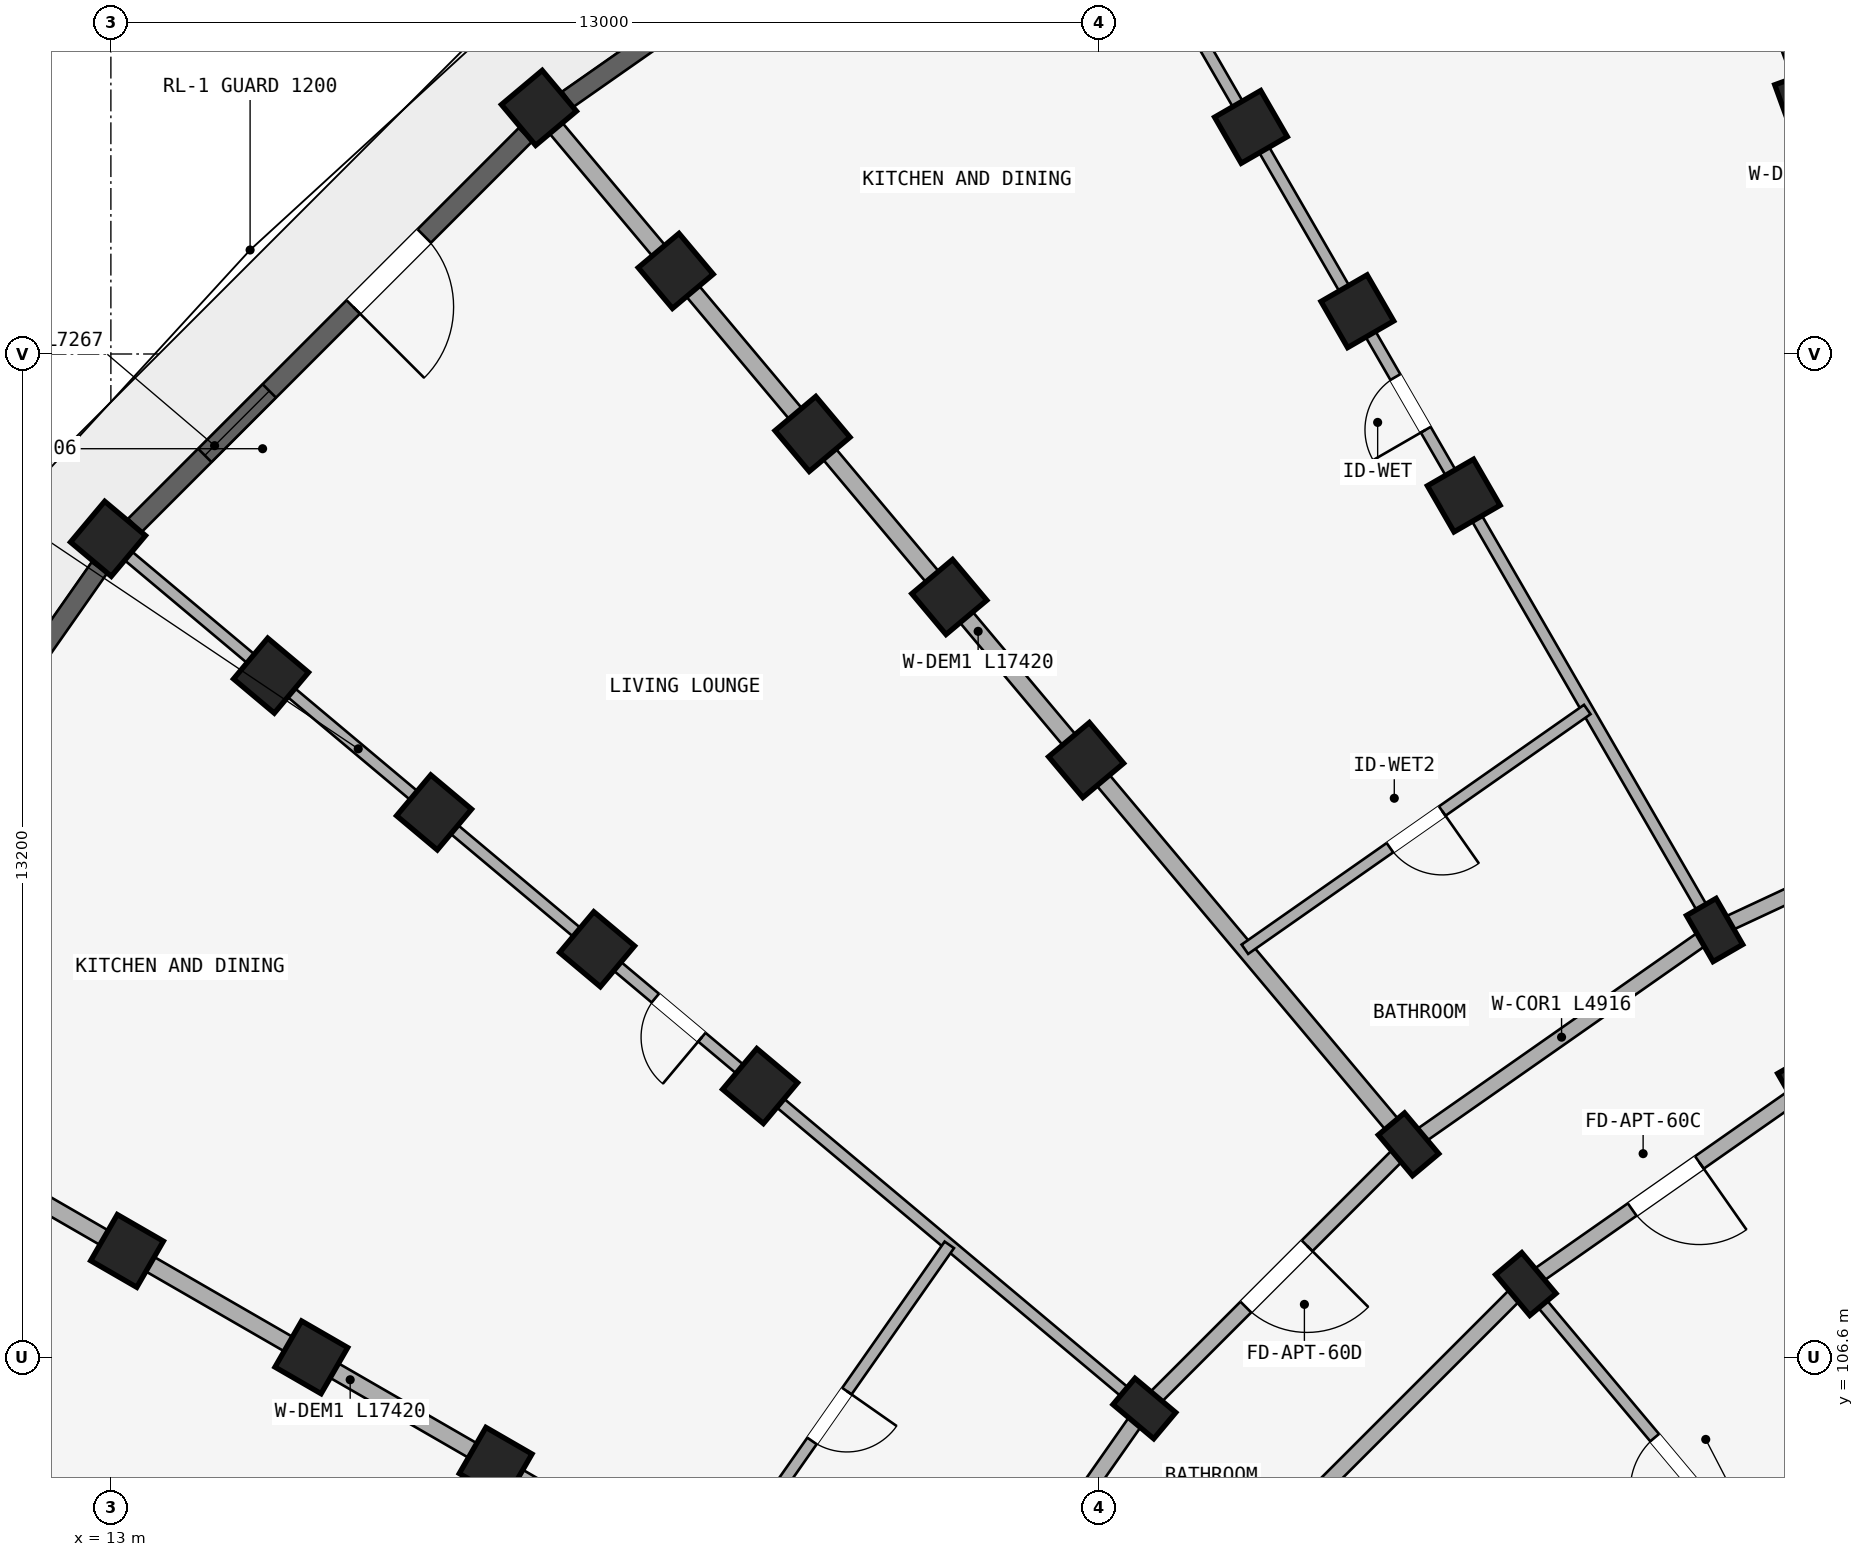
"""IFC4 building model, lengths in metres.
Left out: names, types, materials, properties, quantities, classifications, styles, units other than length and angle.
Written with IfcOpenShell. Run it as: python <this file> out.ifc"""

import sys

from ifc_helpers import new_model, si_unit, direction, frame, frame_2d, origin, origin_2d, place, context, subcontext, project, spatial, rectangle, extrude, element, fill, save


model = new_model("IFC4")
c1 = context("Model", 3, precision=1e-05, world=origin(), true_north=direction((0.0, 1.0)))
c2 = subcontext(c1, "Body", "Model", "MODEL_VIEW")
j1 = project(units=[si_unit("LENGTHUNIT", "METRE"), si_unit("PLANEANGLEUNIT", "RADIAN")], contexts=[c1])
p1 = place(None, origin())
s1 = spatial("IfcSite", under=j1, at=p1, CompositionType="ELEMENT")
p2 = place(p1, origin())
s2 = spatial("IfcBuilding", under=s1, at=p2, CompositionType="ELEMENT")
p3 = place(p2, frame((0.0, 0.0, 24.45)))
s3 = spatial("IfcBuildingStorey", under=s2, at=p3, CompositionType="ELEMENT", Elevation=24.45)
p4 = place(p3, frame((35.34, 123.132, 0.0), z_axis=(0.0, 0.0, 1.0), x_axis=(0.939692620786, 0.342020143326, 0.0)))
e1 = element("IfcColumn", 1, at=p4, inside=s3, PredefinedType="COLUMN", context=c2, shape_type="SweptSolid", body=[
    extrude(rectangle(XDim=0.7, YDim=0.7, at=origin_2d()), origin(), (0.0, 0.0, 1.0), 2.93),
])
for number, where, z_axis, x_axis in (
    (2, (35.3, 110.144, 0.0), (0.0, 0.0, 1.0), (0.866, 0.5, 0.0)),
    (3, (34.1, 112.222, 0.0), (0.0, 0.0, 1.0), (0.866, 0.5, 0.0)),
):
    element("IfcColumn", number, at=place(p3, frame(where, z_axis=z_axis, x_axis=x_axis)), inside=s3, PredefinedType="COLUMN", context=c2, shape_type="SweptSolid", body=[
        extrude(rectangle(XDim=0.45, YDim=0.7, at=origin_2d()), origin(), (0.0, 0.0, 1.0), 2.93),
    ])
for number, where, z_axis, x_axis in (
    (4, (30.8, 117.938, 0.0), (0.0, 0.0, 1.0), (0.866, 0.5, 0.0)),
    (5, (29.4, 120.363, 0.0), (0.0, 0.0, 1.0), (0.866, 0.5, 0.0)),
    (6, (28.0, 122.787, 0.0), (0.0, 0.0, 1.0), (0.866, 0.5, 0.0)),
):
    element("IfcColumn", number, at=place(p3, frame(where, z_axis=z_axis, x_axis=x_axis)), inside=s3, PredefinedType="COLUMN", context=c2, shape_type="SweptSolid", body=[
        extrude(rectangle(XDim=0.7, YDim=0.7, at=origin_2d()), origin(), (0.0, 0.0, 1.0), 2.93),
    ])
for number, where, z_axis, x_axis in (
    (7, (31.616, 107.564, 0.0), (0.0, 0.0, 1.0), (0.766, 0.643, 0.0)),
    (8, (30.073, 109.402, 0.0), (0.0, 0.0, 1.0), (0.766, 0.643, 0.0)),
):
    element("IfcColumn", number, at=place(p3, frame(where, z_axis=z_axis, x_axis=x_axis)), inside=s3, PredefinedType="COLUMN", context=c2, shape_type="SweptSolid", body=[
        extrude(rectangle(XDim=0.45, YDim=0.7, at=origin_2d()), origin(), (0.0, 0.0, 1.0), 2.93),
    ])
for number, where, z_axis, x_axis in (
    (9, (25.831, 114.458, 0.0), (0.0, 0.0, 1.0), (0.766, 0.643, 0.0)),
    (10, (24.031, 116.603, 0.0), (0.0, 0.0, 1.0), (0.766, 0.643, 0.0)),
    (11, (22.231, 118.748, 0.0), (0.0, 0.0, 1.0), (0.766, 0.643, 0.0)),
    (12, (20.432, 120.893, 0.0), (0.0, 0.0, 1.0), (0.766, 0.643, 0.0)),
    (13, (18.632, 123.038, 0.0), (0.0, 0.0, 1.0), (0.766, 0.643, 0.0)),
):
    element("IfcColumn", number, at=place(p3, frame(where, z_axis=z_axis, x_axis=x_axis)), inside=s3, PredefinedType="COLUMN", context=c2, shape_type="SweptSolid", body=[
        extrude(rectangle(XDim=0.7, YDim=0.7, at=origin_2d()), origin(), (0.0, 0.0, 1.0), 2.93),
    ])
p5 = place(p3, frame((26.598, 105.927, 0.0), z_axis=(0.0, 0.0, 1.0), x_axis=(0.642787609687, 0.766044443119, 0.0)))
e14 = element("IfcColumn", 14, at=p5, inside=s3, PredefinedType="COLUMN", context=c2, shape_type="SweptSolid", body=[
    extrude(rectangle(XDim=0.45, YDim=0.7, at=origin_2d()), origin(), (0.0, 0.0, 1.0), 2.93),
])
for number, where, z_axis, x_axis in (
    (15, (21.542, 110.169, 0.0), (0.0, 0.0, 1.0), (0.643, 0.766, 0.0)),
    (16, (19.397, 111.969, 0.0), (0.0, 0.0, 1.0), (0.643, 0.766, 0.0)),
    (17, (17.252, 113.769, 0.0), (0.0, 0.0, 1.0), (0.643, 0.766, 0.0)),
    (18, (15.107, 115.568, 0.0), (0.0, 0.0, 1.0), (0.643, 0.766, 0.0)),
    (19, (12.962, 117.368, 0.0), (0.0, 0.0, 1.0), (0.643, 0.766, 0.0)),
    (20, (18.062, 105.2, 0.0), (0.0, 0.0, 1.0), (0.5, 0.866, 0.0)),
    (21, (15.637, 106.6, 0.0), (0.0, 0.0, 1.0), (0.5, 0.866, 0.0)),
    (22, (13.213, 108.0, 0.0), (0.0, 0.0, 1.0), (0.5, 0.866, 0.0)),
):
    element("IfcColumn", number, at=place(p3, frame(where, z_axis=z_axis, x_axis=x_axis)), inside=s3, PredefinedType="COLUMN", context=c2, shape_type="SweptSolid", body=[
        extrude(rectangle(XDim=0.7, YDim=0.7, at=origin_2d()), origin(), (0.0, 0.0, 1.0), 2.93),
    ])
p6 = place(p3, frame((38.555, 114.299, 0.0), z_axis=(0.0, 0.0, 1.0), x_axis=(-0.906302381024, -0.422629854778, 0.0)))
e23 = element("IfcWall", 23, at=p6, inside=s3, PredefinedType="STANDARD", context=c2, shape_type="SweptSolid", body=[
    extrude(rectangle(XDim=4.915, YDim=0.2, at=frame_2d((2.458, 0.0))), origin(), (0.0, 0.0, 1.0), 2.372),
])
p7 = place(p6, frame((1.918, 0.0, 0.0)))
e24 = element("IfcOpeningElement", 24, at=p7, cuts=e23, PredefinedType="OPENING", context=c2, shape_type="SweptSolid", body=[
    extrude(rectangle(XDim=1.08, YDim=2.15, at=frame_2d((0.54, 1.075))), frame((0.0, 0.11, 0.0), z_axis=(0.0, -1.0, 0.0), x_axis=(1.0, 0.0, 0.0)), (0.0, 0.0, 1.0), 0.22),
])
p8 = place(p3, frame((35.3, 110.144, 0.0), z_axis=(0.0, 0.0, 1.0), x_axis=(-0.819155404658, -0.573571637217, 0.0)))
e25 = element("IfcWall", 25, at=p8, inside=s3, PredefinedType="STANDARD", context=c2, shape_type="SweptSolid", body=[
    extrude(rectangle(XDim=4.497, YDim=0.2, at=frame_2d((2.249, 0.0))), origin(), (0.0, 0.0, 1.0), 2.372),
])
p9 = place(p8, frame((1.709, 0.0, 0.0)))
e26 = element("IfcOpeningElement", 26, at=p9, cuts=e25, PredefinedType="OPENING", context=c2, shape_type="SweptSolid", body=[
    extrude(rectangle(XDim=1.08, YDim=2.15, at=frame_2d((0.54, 1.075))), frame((0.0, 0.11, 0.0), z_axis=(0.0, -1.0, 0.0), x_axis=(1.0, 0.0, 0.0)), (0.0, 0.0, 1.0), 0.22),
])
p10 = place(p3, frame((34.1, 112.222, 0.0), z_axis=(0.0, 0.0, 1.0), x_axis=(-0.819140911474, -0.573592335331, 0.0)))
e27 = element("IfcWall", 27, at=p10, inside=s3, PredefinedType="STANDARD", context=c2, shape_type="SweptSolid", body=[
    extrude(rectangle(XDim=4.916, YDim=0.2, at=frame_2d((2.458, 0.0))), origin(), (0.0, 0.0, 1.0), 2.372),
])
p11 = place(p3, frame((31.616, 107.564, 0.0), z_axis=(0.0, 0.0, 1.0), x_axis=(-0.707106781187, -0.707106781187, 0.0)))
e28 = element("IfcWall", 28, at=p11, inside=s3, PredefinedType="STANDARD", context=c2, shape_type="SweptSolid", body=[
    extrude(rectangle(XDim=4.497, YDim=0.2, at=frame_2d((2.249, 0.0))), origin(), (0.0, 0.0, 1.0), 2.372),
])
p12 = place(p3, frame((30.073, 109.402, 0.0), z_axis=(0.0, 0.0, 1.0), x_axis=(-0.707106781187, -0.707106781187, 0.0)))
e29 = element("IfcWall", 29, at=p12, inside=s3, PredefinedType="STANDARD", context=c2, shape_type="SweptSolid", body=[
    extrude(rectangle(XDim=4.916, YDim=0.2, at=frame_2d((2.458, 0.0))), origin(), (0.0, 0.0, 1.0), 2.372),
])
p13 = place(p12, frame((1.888, 0.0, 0.0)))
e30 = element("IfcOpeningElement", 30, at=p13, cuts=e29, PredefinedType="OPENING", context=c2, shape_type="SweptSolid", body=[
    extrude(rectangle(XDim=1.14, YDim=2.15, at=frame_2d((0.57, 1.075))), frame((0.0, 0.11, 0.0), z_axis=(0.0, -1.0, 0.0), x_axis=(1.0, 0.0, 0.0)), (0.0, 0.0, 1.0), 0.22),
])
p14 = place(p3, frame((26.598, 105.927, 0.0), z_axis=(0.0, 0.0, 1.0), x_axis=(-0.573592335331, -0.819140911474, 0.0)))
e31 = element("IfcWall", 31, at=p14, inside=s3, PredefinedType="STANDARD", context=c2, shape_type="SweptSolid", body=[
    extrude(rectangle(XDim=4.916, YDim=0.2, at=frame_2d((2.458, 0.0))), origin(), (0.0, 0.0, 1.0), 2.372),
])
p15 = place(p3, frame((38.521, 114.393, 0.0), z_axis=(0.0, 0.0, 1.0), x_axis=(-0.342022120477, 0.939691901159, 0.0)))
e32 = element("IfcWall", 32, at=p15, inside=s3, PredefinedType="STANDARD", context=c2, shape_type="SweptSolid", body=[
    extrude(rectangle(XDim=17.42, YDim=0.22, at=frame_2d((8.71, 0.0))), origin(), (0.0, 0.0, 1.0), 2.372),
])
p16 = place(p3, frame((34.05, 112.309, 0.0), z_axis=(0.0, 0.0, 1.0), x_axis=(-0.499997843263, 0.866026648973, 0.0)))
e33 = element("IfcWall", 33, at=p16, inside=s3, PredefinedType="PARTITIONING", context=c2, shape_type="SweptSolid", body=[
    extrude(rectangle(XDim=17.42, YDim=0.15, at=frame_2d((8.71, 0.0))), origin(), (0.0, 0.0, 1.0), 2.372),
])
p17 = place(p16, frame((7.5, 0.0, 0.0)))
e34 = element("IfcOpeningElement", 34, at=p17, cuts=e33, PredefinedType="OPENING", context=c2, shape_type="SweptSolid", body=[
    extrude(rectangle(XDim=0.8, YDim=2.1, at=frame_2d((0.4, 1.05))), frame((0.0, 0.085, 0.0), z_axis=(0.0, -1.0, 0.0), x_axis=(1.0, 0.0, 0.0)), (0.0, 0.0, 1.0), 0.17),
])
p18 = place(p3, frame((35.987, 102.355, 0.0), z_axis=(0.0, 0.0, 1.0), x_axis=(-0.642784846501, 0.766046761698, 0.0)))
e35 = element("IfcWall", 35, at=p18, inside=s3, PredefinedType="PARTITIONING", context=c2, shape_type="SweptSolid", body=[
    extrude(rectangle(XDim=6.75, YDim=0.15, at=frame_2d((3.375, 0.0))), origin(), (0.0, 0.0, 1.0), 2.372),
])
p19 = place(p18, frame((3.262, 0.0, 0.0)))
e36 = element("IfcOpeningElement", 36, at=p19, cuts=e35, PredefinedType="OPENING", context=c2, shape_type="SweptSolid", body=[
    extrude(rectangle(XDim=0.9, YDim=2.1, at=frame_2d((0.45, 1.05))), frame((0.0, 0.085, 0.0), z_axis=(0.0, -1.0, 0.0), x_axis=(1.0, 0.0, 0.0)), (0.0, 0.0, 1.0), 0.17),
])
p20 = place(p3, frame((30.009, 109.479, 0.0), z_axis=(0.0, 0.0, 1.0), x_axis=(-0.642784757967, 0.766046835987, 0.0)))
e37 = element("IfcWall", 37, at=p20, inside=s3, PredefinedType="STANDARD", context=c2, shape_type="SweptSolid", body=[
    extrude(rectangle(XDim=17.42, YDim=0.22, at=frame_2d((8.71, 0.0))), origin(), (0.0, 0.0, 1.0), 2.372),
])
p21 = place(p3, frame((26.521, 105.991, 0.0), z_axis=(0.0, 0.0, 1.0), x_axis=(-0.766046835987, 0.642784757967, 0.0)))
e38 = element("IfcWall", 38, at=p21, inside=s3, PredefinedType="PARTITIONING", context=c2, shape_type="SweptSolid", body=[
    extrude(rectangle(XDim=17.42, YDim=0.15, at=frame_2d((8.71, 0.0))), origin(), (0.0, 0.0, 1.0), 2.372),
])
p22 = place(p21, frame((7.5, 0.0, 0.0)))
e39 = element("IfcOpeningElement", 39, at=p22, cuts=e38, PredefinedType="OPENING", context=c2, shape_type="SweptSolid", body=[
    extrude(rectangle(XDim=0.8, YDim=2.1, at=frame_2d((0.4, 1.05))), frame((0.0, 0.085, 0.0), z_axis=(0.0, -1.0, 0.0), x_axis=(1.0, 0.0, 0.0)), (0.0, 0.0, 1.0), 0.17),
])
p23 = place(p3, frame((23.691, 101.95, 0.0), z_axis=(0.0, 0.0, 1.0), x_axis=(-0.866026648973, 0.499997843263, 0.0)))
e40 = element("IfcWall", 40, at=p23, inside=s3, PredefinedType="STANDARD", context=c2, shape_type="SweptSolid", body=[
    extrude(rectangle(XDim=17.42, YDim=0.22, at=frame_2d((8.71, 0.0))), origin(), (0.0, 0.0, 1.0), 2.372),
])
p24 = place(p3, frame((32.425, 115.123, 0.0), z_axis=(0.0, 0.0, 1.0), x_axis=(-0.819156831143, -0.573569599955, 0.0)))
e41 = element("IfcWall", 41, at=p24, inside=s3, PredefinedType="PLUMBINGWALL", context=c2, shape_type="SweptSolid", body=[
    extrude(rectangle(XDim=5.5, YDim=0.15, at=frame_2d((2.75, 0.0))), origin(), (0.0, 0.0, 1.0), 2.372),
])
p25 = place(p24, frame((2.33, 0.0, 0.0)))
e42 = element("IfcOpeningElement", 42, at=p25, cuts=e41, PredefinedType="OPENING", context=c2, shape_type="SweptSolid", body=[
    extrude(rectangle(XDim=0.84, YDim=2.1, at=frame_2d((0.42, 1.05))), frame((0.0, 0.085, 0.0), z_axis=(0.0, -1.0, 0.0), x_axis=(1.0, 0.0, 0.0)), (0.0, 0.0, 1.0), 0.17),
])
p26 = place(p3, frame((24.031, 108.08, 0.0), z_axis=(0.0, 0.0, 1.0), x_axis=(-0.573569599955, -0.819156831143, 0.0)))
e43 = element("IfcWall", 43, at=p26, inside=s3, PredefinedType="PLUMBINGWALL", context=c2, shape_type="SweptSolid", body=[
    extrude(rectangle(XDim=5.5, YDim=0.15, at=frame_2d((2.75, 0.0))), origin(), (0.0, 0.0, 1.0), 2.372),
])
p27 = place(p26, frame((2.35, 0.0, 0.0)))
e44 = element("IfcOpeningElement", 44, at=p27, cuts=e43, PredefinedType="OPENING", context=c2, shape_type="SweptSolid", body=[
    extrude(rectangle(XDim=0.8, YDim=2.1, at=frame_2d((0.4, 1.05))), frame((0.0, 0.085, 0.0), z_axis=(0.0, -1.0, 0.0), x_axis=(1.0, 0.0, 0.0)), (0.0, 0.0, 1.0), 0.17),
])
p28 = place(p3, frame((24.964, 127.319, 0.0), z_axis=(0.0, 0.0, 1.0), x_axis=(-0.819159308599, -0.573566061701, 0.0)))
e45 = element("IfcWall", 45, at=p28, inside=s3, PredefinedType="STANDARD", context=c2, shape_type="SweptSolid", body=[
    extrude(rectangle(XDim=7.267, YDim=0.25, at=frame_2d((3.633, 0.0))), origin(), (0.0, 0.0, 1.0), 2.372),
])
p29 = place(p28, frame((2.583, 0.0, 0.372)))
e46 = element("IfcOpeningElement", 46, at=p29, cuts=e45, PredefinedType="OPENING", context=c2, shape_type="SweptSolid", body=[
    extrude(rectangle(XDim=2.1, YDim=1.8, at=frame_2d((1.05, 0.9))), frame((0.0, 0.135, 0.0), z_axis=(0.0, -1.0, 0.0), x_axis=(1.0, 0.0, 0.0)), (0.0, 0.0, 1.0), 0.27),
])
p30 = place(p3, frame((18.454, 122.684, 0.0), z_axis=(0.0, 0.0, 1.0), x_axis=(-0.707106781187, -0.707106781187, 0.0)))
e47 = element("IfcWall", 47, at=p30, inside=s3, PredefinedType="STANDARD", context=c2, shape_type="SweptSolid", body=[
    extrude(rectangle(XDim=7.267, YDim=0.25, at=frame_2d((3.633, 0.0))), origin(), (0.0, 0.0, 1.0), 2.372),
])
p31 = place(p30, frame((4.766, 0.0, 0.322)))
e48 = element("IfcOpeningElement", 48, at=p31, cuts=e47, PredefinedType="OPENING", context=c2, shape_type="SweptSolid", body=[
    extrude(rectangle(XDim=1.2, YDim=1.5, at=frame_2d((0.6, 0.75))), frame((0.0, 0.135, 0.0), z_axis=(0.0, -1.0, 0.0), x_axis=(1.0, 0.0, 0.0)), (0.0, 0.0, 1.0), 0.27),
])
p32 = place(p30, frame((1.883, 0.0, 0.0)))
e49 = element("IfcOpeningElement", 49, at=p32, cuts=e47, PredefinedType="OPENING", context=c2, shape_type="SweptSolid", body=[
    extrude(rectangle(XDim=1.32, YDim=2.15, at=frame_2d((0.66, 1.075))), frame((0.0, 0.135, 0.0), z_axis=(0.0, -1.0, 0.0), x_axis=(1.0, 0.0, 0.0)), (0.0, 0.0, 1.0), 0.27),
])
p33 = place(p3, frame((12.849, 116.989, 0.0), z_axis=(0.0, 0.0, 1.0), x_axis=(-0.573566061701, -0.819159308599, 0.0)))
e50 = element("IfcWall", 50, at=p33, inside=s3, PredefinedType="STANDARD", context=c2, shape_type="SweptSolid", body=[
    extrude(rectangle(XDim=7.267, YDim=0.25, at=frame_2d((3.633, 0.0))), origin(), (0.0, 0.0, 1.0), 2.372),
])
p34 = place(p33, frame((2.733, 0.0, 0.522)))
e51 = element("IfcOpeningElement", 51, at=p34, cuts=e50, PredefinedType="OPENING", context=c2, shape_type="SweptSolid", body=[
    extrude(rectangle(XDim=1.8, YDim=1.65, at=frame_2d((0.9, 0.825))), frame((0.0, 0.135, 0.0), z_axis=(0.0, -1.0, 0.0), x_axis=(1.0, 0.0, 0.0)), (0.0, 0.0, 1.0), 0.27),
])
p35 = place(p31, origin())
e52 = element("IfcWindow", 52, at=p35, inside=s3, PartitioningType="SINGLE_PANEL", PredefinedType="WINDOW", context=c2, shape_type="SweptSolid", body=[
    extrude(rectangle(XDim=1.2, YDim=1.5, at=frame_2d((0.6, 0.75))), frame((0.0, 0.03, 0.0), z_axis=(0.0, -1.0, 0.0), x_axis=(1.0, 0.0, 0.0)), (0.0, 0.0, 1.0), 0.06),
])
fill(e48, e52)
p36 = place(p17, frame((0.8, 0.0, 0.0), z_axis=(0.0, 0.0, 1.0), x_axis=(-1.0, 0.0, 0.0)))
e53 = element("IfcDoor", 53, at=p36, inside=s3, OperationType="SINGLE_SWING_RIGHT", PredefinedType="DOOR", context=c2, shape_type="SweptSolid", body=[
    extrude(rectangle(XDim=0.8, YDim=2.1, at=frame_2d((0.4, 1.05))), frame((0.0, 0.025, 0.0), z_axis=(0.0, -1.0, 0.0), x_axis=(1.0, 0.0, 0.0)), (0.0, 0.0, 1.0), 0.05),
])
fill(e34, e53)
p37 = place(p19, origin())
e54 = element("IfcDoor", 54, at=p37, inside=s3, OperationType="SINGLE_SWING_LEFT", PredefinedType="DOOR", context=c2, shape_type="SweptSolid", body=[
    extrude(rectangle(XDim=0.9, YDim=2.1, at=frame_2d((0.45, 1.05))), frame((0.0, 0.025, 0.0), z_axis=(0.0, -1.0, 0.0), x_axis=(1.0, 0.0, 0.0)), (0.0, 0.0, 1.0), 0.05),
])
fill(e36, e54)
p38 = place(p22, origin())
e55 = element("IfcDoor", 55, at=p38, inside=s3, OperationType="SINGLE_SWING_LEFT", PredefinedType="DOOR", context=c2, shape_type="SweptSolid", body=[
    extrude(rectangle(XDim=0.8, YDim=2.1, at=frame_2d((0.4, 1.05))), frame((0.0, 0.025, 0.0), z_axis=(0.0, -1.0, 0.0), x_axis=(1.0, 0.0, 0.0)), (0.0, 0.0, 1.0), 0.05),
])
fill(e39, e55)
p39 = place(p25, origin())
e56 = element("IfcDoor", 56, at=p39, inside=s3, OperationType="SINGLE_SWING_LEFT", PredefinedType="DOOR", context=c2, shape_type="SweptSolid", body=[
    extrude(rectangle(XDim=0.84, YDim=2.1, at=frame_2d((0.42, 1.05))), frame((0.0, 0.025, 0.0), z_axis=(0.0, -1.0, 0.0), x_axis=(1.0, 0.0, 0.0)), (0.0, 0.0, 1.0), 0.05),
])
fill(e42, e56)
p40 = place(p13, frame((1.14, 0.0, 0.0), z_axis=(0.0, 0.0, 1.0), x_axis=(-1.0, 0.0, 0.0)))
e57 = element("IfcDoor", 57, at=p40, inside=s3, OperationType="SINGLE_SWING_RIGHT", PredefinedType="DOOR", context=c2, shape_type="SweptSolid", body=[
    extrude(rectangle(XDim=1.14, YDim=2.15, at=frame_2d((0.57, 1.075))), frame((0.0, 0.025, 0.0), z_axis=(0.0, -1.0, 0.0), x_axis=(1.0, 0.0, 0.0)), (0.0, 0.0, 1.0), 0.05),
])
fill(e30, e57)
p41 = place(p27, origin())
e58 = element("IfcDoor", 58, at=p41, inside=s3, OperationType="SINGLE_SWING_LEFT", PredefinedType="DOOR", context=c2, shape_type="SweptSolid", body=[
    extrude(rectangle(XDim=0.8, YDim=2.1, at=frame_2d((0.4, 1.05))), frame((0.0, 0.025, 0.0), z_axis=(0.0, -1.0, 0.0), x_axis=(1.0, 0.0, 0.0)), (0.0, 0.0, 1.0), 0.05),
])
fill(e44, e58)
p42 = place(p9, origin())
e59 = element("IfcDoor", 59, at=p42, inside=s3, OperationType="SINGLE_SWING_LEFT", PredefinedType="DOOR", context=c2, shape_type="SweptSolid", body=[
    extrude(rectangle(XDim=1.08, YDim=2.15, at=frame_2d((0.54, 1.075))), frame((0.0, 0.025, 0.0), z_axis=(0.0, -1.0, 0.0), x_axis=(1.0, 0.0, 0.0)), (0.0, 0.0, 1.0), 0.05),
])
fill(e26, e59)
p43 = place(p32, frame((1.32, 0.0, 0.0), z_axis=(0.0, 0.0, 1.0), x_axis=(-1.0, 0.0, 0.0)))
e60 = element("IfcDoor", 60, at=p43, inside=s3, OperationType="SINGLE_SWING_LEFT", PredefinedType="DOOR", context=c2, shape_type="SweptSolid", body=[
    extrude(rectangle(XDim=1.32, YDim=2.15, at=frame_2d((0.66, 1.075))), frame((0.0, 0.025, 0.0), z_axis=(0.0, -1.0, 0.0), x_axis=(1.0, 0.0, 0.0)), (0.0, 0.0, 1.0), 0.05),
])
fill(e49, e60)
save(model, sys.argv[1])
